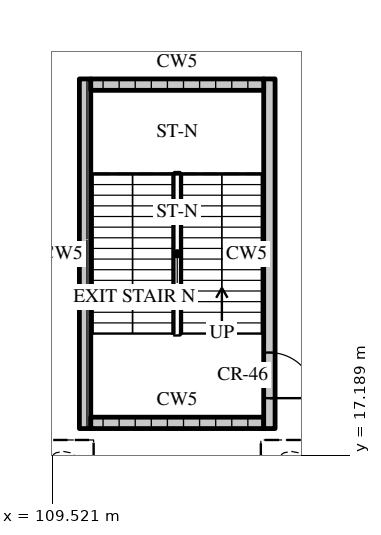
"""IFC4 building model, lengths in metres.
Left out: names, types, materials, properties, quantities, classifications, styles, units other than length and angle.
Written with IfcOpenShell. Run it as: python <this file> out.ifc"""

import sys

from ifc_helpers import new_model, si_unit, direction, frame, frame_2d, origin, place, context, subcontext, project, spatial, rectangle, extrude, element, fill, save


model = new_model("IFC4")
c1 = context("Model", 3, precision=1e-05, world=origin(), true_north=direction((0.0, 1.0)))
c2 = subcontext(c1, "Body", "Model", "MODEL_VIEW")
j1 = project(units=[si_unit("LENGTHUNIT", "METRE"), si_unit("PLANEANGLEUNIT", "RADIAN")], contexts=[c1])
p1 = place(None, origin())
s1 = spatial("IfcSite", under=j1, at=p1, CompositionType="ELEMENT")
p2 = place(p1, origin())
s2 = spatial("IfcBuilding", under=s1, at=p2, CompositionType="ELEMENT")
p3 = place(p2, frame((0.0, 0.0, -6.0)))
s3 = spatial("IfcBuildingStorey", under=s2, at=p3, CompositionType="ELEMENT", Elevation=-6.0)
p4 = place(p3, frame((110.375, 17.9, 0.0), z_axis=(0.0, 0.0, 1.0), x_axis=(0.0, 1.0, 0.0)))
e1 = element("IfcWall", 1, at=p4, inside=s3, PredefinedType="SOLIDWALL", context=c2, shape_type="SweptSolid", body=[
    extrude(rectangle(XDim=9.2, YDim=0.3, at=frame_2d((4.6, 0.0))), origin(), (0.0, 0.0, 1.0), 5.7),
])
p5 = place(p3, frame((110.525, 18.05, 0.0), z_axis=(0.0, 0.0, 1.0), x_axis=(1.0, 0.0, 0.0)))
e2 = element("IfcWall", 2, at=p5, inside=s3, PredefinedType="SOLIDWALL", context=c2, shape_type="SweptSolid", body=[
    extrude(rectangle(XDim=4.55, YDim=0.3, at=frame_2d((2.275, 0.0))), origin(), (0.0, 0.0, 1.0), 5.7),
])
p6 = place(p3, frame((115.225, 17.9, 0.0), z_axis=(0.0, 0.0, 1.0), x_axis=(0.0, 1.0, 0.0)))
e3 = element("IfcWall", 3, at=p6, inside=s3, PredefinedType="SOLIDWALL", context=c2, shape_type="SweptSolid", body=[
    extrude(rectangle(XDim=9.2, YDim=0.3, at=frame_2d((4.6, 0.0))), origin(), (0.0, 0.0, 1.0), 5.7),
])
p7 = place(p6, frame((0.8, 0.0, 0.0)))
e4 = element("IfcOpeningElement", 4, at=p7, cuts=e3, PredefinedType="OPENING", context=c2, shape_type="SweptSolid", body=[
    extrude(rectangle(XDim=1.2, YDim=2.1, at=frame_2d((0.6, 1.05))), frame((0.0, 0.16, 0.0), z_axis=(0.0, -1.0, 0.0), x_axis=(1.0, 0.0, 0.0)), (0.0, 0.0, 1.0), 0.32),
])
p8 = place(p3, frame((110.525, 26.95, 0.0), z_axis=(0.0, 0.0, 1.0), x_axis=(1.0, 0.0, 0.0)))
e5 = element("IfcWall", 5, at=p8, inside=s3, PredefinedType="SOLIDWALL", context=c2, shape_type="SweptSolid", body=[
    extrude(rectangle(XDim=4.55, YDim=0.3, at=frame_2d((2.275, 0.0))), origin(), (0.0, 0.0, 1.0), 5.7),
])
p9 = place(p7, origin())
e6 = element("IfcDoor", 6, at=p9, inside=s3, OperationType="SINGLE_SWING_RIGHT", PredefinedType="DOOR", context=c2, shape_type="SweptSolid", body=[
    extrude(rectangle(XDim=1.2, YDim=2.1, at=frame_2d((0.6, 1.05))), frame((0.0, 0.025, 0.0), z_axis=(0.0, -1.0, 0.0), x_axis=(1.0, 0.0, 0.0)), (0.0, 0.0, 1.0), 0.05),
])
fill(e4, e6)
save(model, sys.argv[1])
